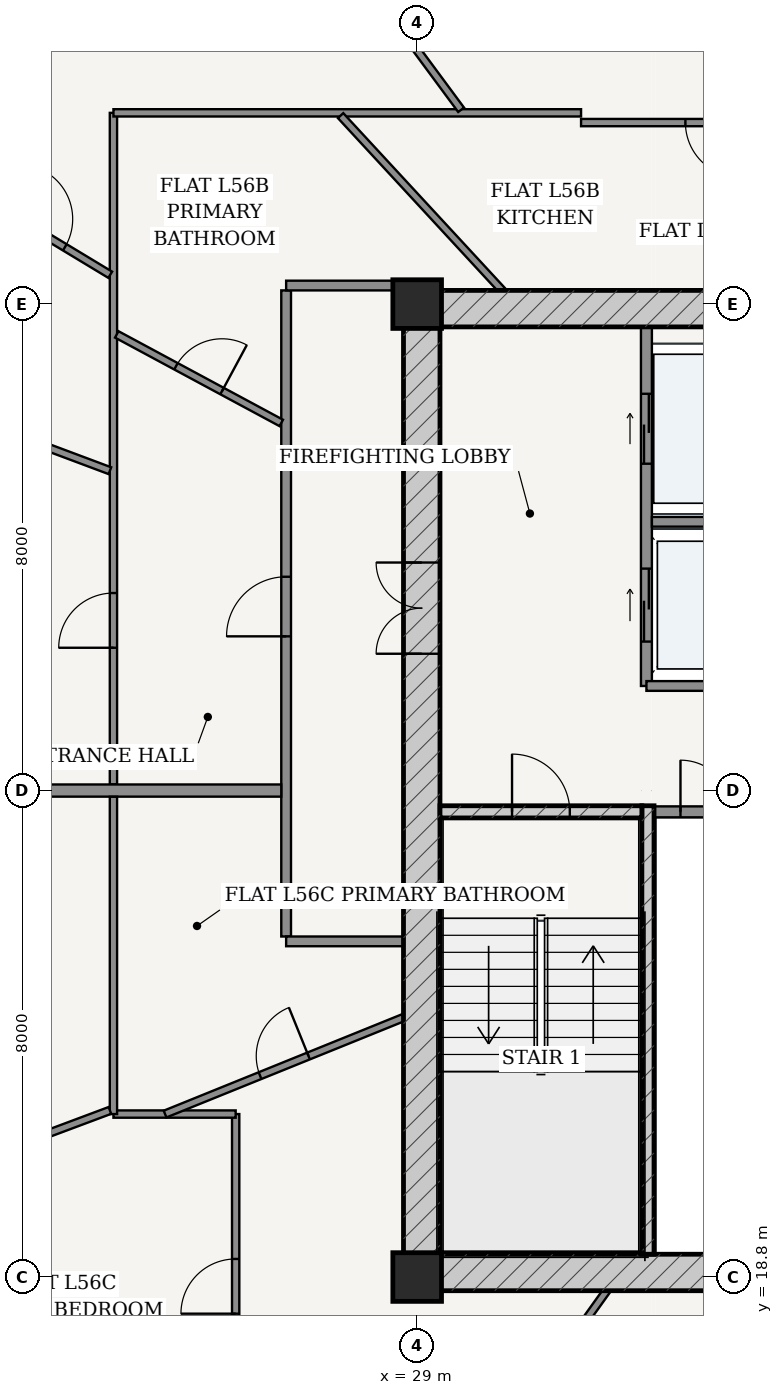
"""IFC4 building model, lengths in metres.
Left out: names, types, materials, properties, quantities, classifications, styles, units other than length and angle.
Written with IfcOpenShell. Run it as: python <this file> out.ifc"""

import sys

from ifc_helpers import new_model, si_unit, direction, frame, frame_2d, origin, origin_2d, place, context, subcontext, project, spatial, rectangle, extrude, source, transform, mapped, element, fill, save


model = new_model("IFC4")
c1 = context("Model", 3, precision=1e-05, world=origin(), true_north=direction((-0.2419218956, 0.970295726276)))
c2 = subcontext(c1, "Body", "Model", "MODEL_VIEW")
j1 = project(units=[si_unit("LENGTHUNIT", "METRE"), si_unit("PLANEANGLEUNIT", "RADIAN")], contexts=[c1])
p1 = place(None, origin())
s1 = spatial("IfcSite", under=j1, at=p1, CompositionType="ELEMENT")
p2 = place(p1, origin())
s2 = spatial("IfcBuilding", under=s1, at=p2, CompositionType="ELEMENT")
p3 = place(p2, frame((0.0, 0.0, 213.4)))
s3 = spatial("IfcBuildingStorey", under=s2, at=p3, CompositionType="ELEMENT", Elevation=213.4)
for number, where, z_axis, x_axis in (
    (1, (29.0, 18.8, 0.0), (0.0, 0.0, 1.0), (1.0, 0.0, 0.0)),
    (2, (29.0, 34.8, 0.0), (0.0, 0.0, 1.0), (1.0, 0.0, 0.0)),
):
    element("IfcColumn", number, at=place(p3, frame(where, z_axis=z_axis, x_axis=x_axis)), inside=s3, PredefinedType="COLUMN", context=c2, shape_type="SweptSolid", body=[
        extrude(rectangle(XDim=0.8, YDim=0.8, at=origin_2d()), origin(), (0.0, 0.0, 1.0), 3.7),
    ])
p4 = place(p3, frame((28.775, 18.875, 0.0), z_axis=(0.0, 0.0, 1.0), x_axis=(1.0, 0.0, 0.0)))
e3 = element("IfcWall", 3, at=p4, inside=s3, PredefinedType="SHEAR", context=c2, shape_type="SweptSolid", body=[
    extrude(rectangle(XDim=18.45, YDim=0.6, at=frame_2d((9.225, 0.0))), origin(), (0.0, 0.0, 1.0), 3.435),
])
p5 = place(p4, frame((7.46, 0.0, 0.0)))
e4 = element("IfcOpeningElement", 4, at=p5, cuts=e3, PredefinedType="OPENING", context=c2, shape_type="SweptSolid", body=[
    extrude(rectangle(XDim=0.85, YDim=2.1, at=frame_2d((0.425, 1.05))), frame((0.0, 0.31, 0.0), z_axis=(0.0, -1.0, 0.0), x_axis=(1.0, 0.0, 0.0)), (0.0, 0.0, 1.0), 0.62),
])
p6 = place(p4, frame((10.54, 0.0, 0.0)))
e5 = element("IfcOpeningElement", 5, at=p6, cuts=e3, PredefinedType="OPENING", context=c2, shape_type="SweptSolid", body=[
    extrude(rectangle(XDim=0.85, YDim=2.1, at=frame_2d((0.425, 1.05))), frame((0.0, 0.31, 0.0), z_axis=(0.0, -1.0, 0.0), x_axis=(1.0, 0.0, 0.0)), (0.0, 0.0, 1.0), 0.62),
])
p7 = place(p3, frame((28.775, 34.725, 0.0), z_axis=(0.0, 0.0, 1.0), x_axis=(1.0, 0.0, 0.0)))
e6 = element("IfcWall", 6, at=p7, inside=s3, PredefinedType="SHEAR", context=c2, shape_type="SweptSolid", body=[
    extrude(rectangle(XDim=18.45, YDim=0.6, at=frame_2d((9.225, 0.0))), origin(), (0.0, 0.0, 1.0), 3.435),
])
p8 = place(p3, frame((29.075, 19.175, 0.0), z_axis=(0.0, 0.0, 1.0), x_axis=(0.0, 1.0, 0.0)))
e7 = element("IfcWall", 7, at=p8, inside=s3, PredefinedType="SHEAR", context=c2, shape_type="SweptSolid", body=[
    extrude(rectangle(XDim=15.25, YDim=0.6, at=frame_2d((7.625, 0.0))), origin(), (0.0, 0.0, 1.0), 3.435),
])
p9 = place(p8, frame((9.875, 0.0, 0.0)))
e8 = element("IfcOpeningElement", 8, at=p9, cuts=e7, PredefinedType="OPENING", context=c2, shape_type="SweptSolid", body=[
    extrude(rectangle(XDim=1.5, YDim=2.2, at=frame_2d((0.75, 1.1))), frame((0.0, 0.31, 0.0), z_axis=(0.0, -1.0, 0.0), x_axis=(1.0, 0.0, 0.0)), (0.0, 0.0, 1.0), 0.62),
])
p10 = place(p3, frame((32.795, 19.175, 0.0), z_axis=(0.0, 0.0, 1.0), x_axis=(0.0, 1.0, 0.0)))
e9 = element("IfcWall", 9, at=p10, inside=s3, PredefinedType="SOLIDWALL", context=c2, shape_type="SweptSolid", body=[
    extrude(rectangle(XDim=7.375, YDim=0.2, at=frame_2d((3.688, 0.0))), origin(), (0.0, 0.0, 1.0), 3.435),
])
p11 = place(p3, frame((29.375, 26.45, 0.0), z_axis=(0.0, 0.0, 1.0), x_axis=(1.0, 0.0, 0.0)))
e10 = element("IfcWall", 10, at=p11, inside=s3, PredefinedType="SOLIDWALL", context=c2, shape_type="SweptSolid", body=[
    extrude(rectangle(XDim=3.32, YDim=0.2, at=frame_2d((1.66, 0.0))), origin(), (0.0, 0.0, 1.0), 3.435),
])
p12 = place(p11, frame((1.185, 0.0, 0.0)))
e11 = element("IfcOpeningElement", 11, at=p12, cuts=e10, PredefinedType="OPENING", context=c2, shape_type="SweptSolid", body=[
    extrude(rectangle(XDim=0.95, YDim=2.15, at=frame_2d((0.475, 1.075))), frame((0.0, 0.11, 0.0), z_axis=(0.0, -1.0, 0.0), x_axis=(1.0, 0.0, 0.0)), (0.0, 0.0, 1.0), 0.22),
])
p13 = place(p3, frame((32.9, 26.45, 0.0), z_axis=(0.0, 0.0, 1.0), x_axis=(1.0, 0.0, 0.0)))
e12 = element("IfcWall", 12, at=p13, inside=s3, PredefinedType="PARTITIONING", context=c2, shape_type="SweptSolid", body=[
    extrude(rectangle(XDim=1.71, YDim=0.18, at=frame_2d((0.855, 0.0))), origin(), (0.0, 0.0, 1.0), 3.435),
])
p14 = place(p13, frame((0.43, 0.0, 0.0)))
e13 = element("IfcOpeningElement", 13, at=p14, cuts=e12, PredefinedType="OPENING", context=c2, shape_type="SweptSolid", body=[
    extrude(rectangle(XDim=0.85, YDim=2.1, at=frame_2d((0.425, 1.05))), frame((0.0, 0.1, 0.0), z_axis=(0.0, -1.0, 0.0), x_axis=(1.0, 0.0, 0.0)), (0.0, 0.0, 1.0), 0.2),
])
p15 = place(p3, frame((32.77, 28.52, 0.0), z_axis=(0.0, 0.0, 1.0), x_axis=(0.0, 1.0, 0.0)))
e14 = element("IfcWall", 14, at=p15, inside=s3, PredefinedType="PARTITIONING", context=c2, shape_type="SweptSolid", body=[
    extrude(rectangle(XDim=5.905, YDim=0.18, at=frame_2d((2.953, 0.0))), origin(), (0.0, 0.0, 1.0), 3.435),
])
p16 = place(p15, frame((3.655, 0.0, 0.0)))
e15 = element("IfcOpeningElement", 15, at=p16, cuts=e14, PredefinedType="OPENING", context=c2, shape_type="SweptSolid", body=[
    extrude(rectangle(XDim=1.15, YDim=2.2, at=frame_2d((0.575, 1.1))), frame((0.0, 0.1, 0.0), z_axis=(0.0, -1.0, 0.0), x_axis=(1.0, 0.0, 0.0)), (0.0, 0.0, 1.0), 0.2),
])
p17 = place(p15, frame((0.73, 0.0, 0.0)))
e16 = element("IfcOpeningElement", 16, at=p17, cuts=e14, PredefinedType="OPENING", context=c2, shape_type="SweptSolid", body=[
    extrude(rectangle(XDim=1.2, YDim=2.25, at=frame_2d((0.6, 1.125))), frame((0.0, 0.1, 0.0), z_axis=(0.0, -1.0, 0.0), x_axis=(1.0, 0.0, 0.0)), (0.0, 0.0, 1.0), 0.2),
])
p18 = place(p3, frame((32.86, 31.22, 0.0), z_axis=(0.0, 0.0, 1.0), x_axis=(1.0, 0.0, 0.0)))
e17 = element("IfcWall", 17, at=p18, inside=s3, PredefinedType="PARTITIONING", context=c2, shape_type="SweptSolid", body=[
    extrude(rectangle(XDim=1.75, YDim=0.16, at=frame_2d((0.875, 0.0))), origin(), (0.0, 0.0, 1.0), 3.435),
])
p19 = place(p3, frame((32.77, 28.52, 0.0), z_axis=(0.0, 0.0, 1.0), x_axis=(1.0, 0.0, 0.0)))
e18 = element("IfcWall", 18, at=p19, inside=s3, PredefinedType="PARTITIONING", context=c2, shape_type="SweptSolid", body=[
    extrude(rectangle(XDim=1.84, YDim=0.16, at=frame_2d((0.92, 0.0))), origin(), (0.0, 0.0, 1.0), 3.435),
])
p20 = place(p3, frame((26.845, 24.4, 0.0), z_axis=(0.0, 0.0, 1.0), x_axis=(0.0, 1.0, 0.0)))
e19 = element("IfcWall", 19, at=p20, inside=s3, PredefinedType="PARTITIONING", context=c2, shape_type="SweptSolid", body=[
    extrude(rectangle(XDim=10.625, YDim=0.16, at=frame_2d((5.312, 0.0))), origin(), (0.0, 0.0, 1.0), 2.951),
])
p21 = place(p20, frame((4.936, 0.0, 0.0)))
e20 = element("IfcOpeningElement", 20, at=p21, cuts=e19, PredefinedType="OPENING", context=c2, shape_type="SweptSolid", body=[
    extrude(rectangle(XDim=0.98, YDim=2.2, at=frame_2d((0.49, 1.1))), frame((0.0, 0.09, 0.0), z_axis=(0.0, -1.0, 0.0), x_axis=(1.0, 0.0, 0.0)), (0.0, 0.0, 1.0), 0.18),
])
for number, where, z_axis, x_axis in (
    (21, (26.845, 35.105, 0.0), (0.0, 0.0, 1.0), (1.0, 0.0, 0.0)),
    (22, (26.845, 24.32, 0.0), (0.0, 0.0, 1.0), (1.0, 0.0, 0.0)),
):
    element("IfcWall", number, at=place(p3, frame(where, z_axis=z_axis, x_axis=x_axis)), inside=s3, PredefinedType="PARTITIONING", context=c2, shape_type="SweptSolid", body=[
        extrude(rectangle(XDim=1.93, YDim=0.16, at=frame_2d((0.965, 0.0))), origin(), (0.0, 0.0, 1.0), 3.435),
    ])
p22 = place(p3, frame((24.005, 26.902, 0.0), z_axis=(0.0, 0.0, 1.0), x_axis=(0.0, 1.0, 0.0)))
e23 = element("IfcWall", 23, at=p22, inside=s3, PredefinedType="PARTITIONING", context=c2, shape_type="SweptSolid", body=[
    extrude(rectangle(XDim=11.043, YDim=0.12, at=frame_2d((5.521, 0.0))), origin(), (0.0, 0.0, 1.0), 2.951),
])
p23 = place(p22, frame((2.246, 0.0, 0.0)))
e24 = element("IfcOpeningElement", 24, at=p23, cuts=e23, PredefinedType="OPENING", context=c2, shape_type="SweptSolid", body=[
    extrude(rectangle(XDim=0.9, YDim=2.15, at=frame_2d((0.45, 1.075))), frame((0.0, 0.07, 0.0), z_axis=(0.0, -1.0, 0.0), x_axis=(1.0, 0.0, 0.0)), (0.0, 0.0, 1.0), 0.14),
])
p24 = place(p3, frame((24.005, 37.945, 0.0), z_axis=(0.0, 0.0, 1.0), x_axis=(1.0, 0.0, 0.0)))
e25 = element("IfcWall", 25, at=p24, inside=s3, PredefinedType="PARTITIONING", context=c2, shape_type="SweptSolid", body=[
    extrude(rectangle(XDim=7.69, YDim=0.12, at=frame_2d((3.845, 0.0))), origin(), (0.0, 0.0, 1.0), 2.951),
])
p25 = place(p3, frame((31.695, 37.785, 0.0), z_axis=(0.0, 0.0, 1.0), x_axis=(1.0, 0.0, 0.0)))
e26 = element("IfcWall", 26, at=p25, inside=s3, PredefinedType="PARTITIONING", context=c2, shape_type="SweptSolid", body=[
    extrude(rectangle(XDim=8.621, YDim=0.12, at=frame_2d((4.311, 0.0))), origin(), (0.0, 0.0, 1.0), 2.951),
])
p26 = place(p25, frame((1.716, 0.0, 0.0)))
e27 = element("IfcOpeningElement", 27, at=p26, cuts=e26, PredefinedType="OPENING", context=c2, shape_type="SweptSolid", body=[
    extrude(rectangle(XDim=0.9, YDim=2.15, at=frame_2d((0.45, 1.075))), frame((0.0, 0.07, 0.0), z_axis=(0.0, -1.0, 0.0), x_axis=(1.0, 0.0, 0.0)), (0.0, 0.0, 1.0), 0.14),
])
p27 = place(p25, frame((5.784, 0.0, 0.0)))
e28 = element("IfcOpeningElement", 28, at=p27, cuts=e26, PredefinedType="OPENING", context=c2, shape_type="SweptSolid", body=[
    extrude(rectangle(XDim=0.9, YDim=2.15, at=frame_2d((0.45, 1.075))), frame((0.0, 0.07, 0.0), z_axis=(0.0, -1.0, 0.0), x_axis=(1.0, 0.0, 0.0)), (0.0, 0.0, 1.0), 0.14),
])
p28 = place(p3, frame((29.722, 37.995, 0.0), z_axis=(0.0, 0.0, 1.0), x_axis=(-0.594518724985, 0.80408176552, 0.0)))
e29 = element("IfcWall", 29, at=p28, inside=s3, PredefinedType="PARTITIONING", context=c2, shape_type="SweptSolid", body=[
    extrude(rectangle(XDim=6.344, YDim=0.12, at=frame_2d((3.172, 0.0))), origin(), (0.0, 0.0, 1.0), 2.951),
])
p29 = place(p28, frame((1.715, 0.0, 0.0)))
e30 = element("IfcOpeningElement", 30, at=p29, cuts=e29, PredefinedType="OPENING", context=c2, shape_type="SweptSolid", body=[
    extrude(rectangle(XDim=0.9, YDim=2.15, at=frame_2d((0.45, 1.075))), frame((0.0, 0.07, 0.0), z_axis=(0.0, -1.0, 0.0), x_axis=(1.0, 0.0, 0.0)), (0.0, 0.0, 1.0), 0.14),
])
p30 = place(p3, frame((23.952, 35.282, 0.0), z_axis=(0.0, 0.0, 1.0), x_axis=(-0.856051317976, 0.516890840499, 0.0)))
e31 = element("IfcWall", 31, at=p30, inside=s3, PredefinedType="PARTITIONING", context=c2, shape_type="SweptSolid", body=[
    extrude(rectangle(XDim=4.658, YDim=0.12, at=frame_2d((2.329, 0.0))), origin(), (0.0, 0.0, 1.0), 2.951),
])
p31 = place(p30, frame((0.872, 0.0, 0.0)))
e32 = element("IfcOpeningElement", 32, at=p31, cuts=e31, PredefinedType="OPENING", context=c2, shape_type="SweptSolid", body=[
    extrude(rectangle(XDim=0.9, YDim=2.15, at=frame_2d((0.45, 1.075))), frame((0.0, 0.07, 0.0), z_axis=(0.0, -1.0, 0.0), x_axis=(1.0, 0.0, 0.0)), (0.0, 0.0, 1.0), 0.14),
])
p32 = place(p3, frame((23.947, 32.06, 0.0), z_axis=(0.0, 0.0, 1.0), x_axis=(-0.936547148815, 0.350541635255, 0.0)))
e33 = element("IfcWall", 33, at=p32, inside=s3, PredefinedType="PARTITIONING", context=c2, shape_type="SweptSolid", body=[
    extrude(rectangle(XDim=6.439, YDim=0.12, at=frame_2d((3.219, 0.0))), origin(), (0.0, 0.0, 1.0), 2.951),
])
p33 = place(p32, frame((2.769, 0.0, 0.0)))
e34 = element("IfcOpeningElement", 34, at=p33, cuts=e33, PredefinedType="OPENING", context=c2, shape_type="SweptSolid", body=[
    extrude(rectangle(XDim=0.9, YDim=2.15, at=frame_2d((0.45, 1.075))), frame((0.0, 0.07, 0.0), z_axis=(0.0, -1.0, 0.0), x_axis=(1.0, 0.0, 0.0)), (0.0, 0.0, 1.0), 0.14),
])
p34 = place(p3, frame((30.396, 35.026, 0.0), z_axis=(0.0, 0.0, 1.0), x_axis=(-0.678759446058, 0.734360684124, 0.0)))
e35 = element("IfcWall", 35, at=p34, inside=s3, PredefinedType="PARTITIONING", context=c2, shape_type="SweptSolid", body=[
    extrude(rectangle(XDim=3.912, YDim=0.12, at=frame_2d((1.956, 0.0))), origin(), (0.0, 0.0, 1.0), 2.951),
])
p35 = place(p3, frame((26.765, 32.845, 0.0), z_axis=(0.0, 0.0, 1.0), x_axis=(-0.88059355453, 0.473872336943, 0.0)))
e36 = element("IfcWall", 36, at=p35, inside=s3, PredefinedType="PARTITIONING", context=c2, shape_type="SweptSolid", body=[
    extrude(rectangle(XDim=3.072, YDim=0.12, at=frame_2d((1.536, 0.0))), origin(), (0.0, 0.0, 1.0), 3.11),
])
p36 = place(p35, frame((1.106, 0.0, 0.0)))
e37 = element("IfcOpeningElement", 37, at=p36, cuts=e36, PredefinedType="OPENING", context=c2, shape_type="SweptSolid", body=[
    extrude(rectangle(XDim=0.86, YDim=2.15, at=frame_2d((0.43, 1.075))), frame((0.0, 0.07, 0.0), z_axis=(0.0, -1.0, 0.0), x_axis=(1.0, 0.0, 0.0)), (0.0, 0.0, 1.0), 0.14),
])
p37 = place(p3, frame((26.765, 26.8, 0.0), z_axis=(0.0, 0.0, 1.0), x_axis=(-1.0, 0.0, 0.0)))
e38 = element("IfcWall", 38, at=p37, inside=s3, PredefinedType="PARTITIONING", context=c2, shape_type="SweptSolid", body=[
    extrude(rectangle(XDim=10.505, YDim=0.2, at=frame_2d((5.252, 0.0))), origin(), (0.0, 0.0, 1.0), 2.951),
])
p38 = place(p3, frame((26.015, 15.815, 0.0), z_axis=(0.0, 0.0, 1.0), x_axis=(0.0, 1.0, 0.0)))
e39 = element("IfcWall", 39, at=p38, inside=s3, PredefinedType="PARTITIONING", context=c2, shape_type="SweptSolid", body=[
    extrude(rectangle(XDim=5.665, YDim=0.12, at=frame_2d((2.833, 0.0))), origin(), (0.0, 0.0, 1.0), 2.951),
])
p39 = place(p38, frame((2.383, 0.0, 0.0)))
e40 = element("IfcOpeningElement", 40, at=p39, cuts=e39, PredefinedType="OPENING", context=c2, shape_type="SweptSolid", body=[
    extrude(rectangle(XDim=0.9, YDim=2.15, at=frame_2d((0.45, 1.075))), frame((0.0, 0.07, 0.0), z_axis=(0.0, -1.0, 0.0), x_axis=(1.0, 0.0, 0.0)), (0.0, 0.0, 1.0), 0.14),
])
p40 = place(p3, frame((26.015, 21.48, 0.0), z_axis=(0.0, 0.0, 1.0), x_axis=(-1.0, 0.0, 0.0)))
e41 = element("IfcWall", 41, at=p40, inside=s3, PredefinedType="PARTITIONING", context=c2, shape_type="SweptSolid", body=[
    extrude(rectangle(XDim=2.01, YDim=0.12, at=frame_2d((1.005, 0.0))), origin(), (0.0, 0.0, 1.0), 3.11),
])
p41 = place(p3, frame((24.005, 21.48, 0.0), z_axis=(0.0, 0.0, 1.0), x_axis=(0.0, 1.0, 0.0)))
e42 = element("IfcWall", 42, at=p41, inside=s3, PredefinedType="PARTITIONING", context=c2, shape_type="SweptSolid", body=[
    extrude(rectangle(XDim=5.218, YDim=0.12, at=frame_2d((2.609, 0.0))), origin(), (0.0, 0.0, 1.0), 2.951),
])
p42 = place(p3, frame((23.947, 21.54, 0.0), z_axis=(0.0, 0.0, 1.0), x_axis=(-0.936534700322, -0.350574892274, 0.0)))
e43 = element("IfcWall", 43, at=p42, inside=s3, PredefinedType="PARTITIONING", context=c2, shape_type="SweptSolid", body=[
    extrude(rectangle(XDim=6.439, YDim=0.12, at=frame_2d((3.219, 0.0))), origin(), (0.0, 0.0, 1.0), 2.951),
])
p43 = place(p42, frame((2.769, 0.0, 0.0)))
e44 = element("IfcOpeningElement", 44, at=p43, cuts=e43, PredefinedType="OPENING", context=c2, shape_type="SweptSolid", body=[
    extrude(rectangle(XDim=0.9, YDim=2.15, at=frame_2d((0.45, 1.075))), frame((0.0, 0.07, 0.0), z_axis=(0.0, -1.0, 0.0), x_axis=(1.0, 0.0, 0.0)), (0.0, 0.0, 1.0), 0.14),
])
p44 = place(p3, frame((28.775, 23.067, 0.0), z_axis=(0.0, 0.0, 1.0), x_axis=(-0.926976443277, -0.375119545757, 0.0)))
e45 = element("IfcWall", 45, at=p44, inside=s3, PredefinedType="PARTITIONING", context=c2, shape_type="SweptSolid", body=[
    extrude(rectangle(XDim=4.23, YDim=0.12, at=frame_2d((2.115, 0.0))), origin(), (0.0, 0.0, 1.0), 3.435),
])
p45 = place(p44, frame((1.685, 0.0, 0.0)))
e46 = element("IfcOpeningElement", 46, at=p45, cuts=e45, PredefinedType="OPENING", context=c2, shape_type="SweptSolid", body=[
    extrude(rectangle(XDim=0.86, YDim=2.15, at=frame_2d((0.43, 1.075))), frame((0.0, 0.07, 0.0), z_axis=(0.0, -1.0, 0.0), x_axis=(1.0, 0.0, 0.0)), (0.0, 0.0, 1.0), 0.14),
])
p46 = place(p3, frame((32.117, 18.575, 0.0), z_axis=(0.0, 0.0, 1.0), x_axis=(-0.581813438478, -0.813322274874, 0.0)))
e47 = element("IfcWall", 47, at=p46, inside=s3, PredefinedType="PARTITIONING", context=c2, shape_type="SweptSolid", body=[
    extrude(rectangle(XDim=3.331, YDim=0.12, at=frame_2d((1.666, 0.0))), origin(), (0.0, 0.0, 1.0), 3.435),
])
p47 = place(p46, frame((1.216, 0.0, 0.0)))
e48 = element("IfcOpeningElement", 48, at=p47, cuts=e47, PredefinedType="OPENING", context=c2, shape_type="SweptSolid", body=[
    extrude(rectangle(XDim=0.9, YDim=2.15, at=frame_2d((0.45, 1.075))), frame((0.0, 0.07, 0.0), z_axis=(0.0, -1.0, 0.0), x_axis=(1.0, 0.0, 0.0)), (0.0, 0.0, 1.0), 0.14),
])
m1 = source(origin(), c2, "Body", "SweptSolid", [
    extrude(rectangle(XDim=1.5, YDim=2.2, at=frame_2d((0.75, 1.1))), frame((0.0, 0.025, 0.0), z_axis=(0.0, -1.0, 0.0), x_axis=(1.0, 0.0, 0.0)), (0.0, 0.0, 1.0), 0.05),
])
p48 = place(p9, origin())
e49 = element("IfcDoor", 49, at=p48, inside=s3, OperationType="DOUBLE_DOOR_SINGLE_SWING", PredefinedType="DOOR", context=c2, shape_type="MappedRepresentation", body=[
    mapped(m1, transform((0.0, 0.0, 0.0), scale=1.0)),
])
fill(e8, e49)
m2 = source(origin(), c2, "Body", "SweptSolid", [
    extrude(rectangle(XDim=0.95, YDim=2.15, at=frame_2d((0.475, 1.075))), frame((0.0, 0.025, 0.0), z_axis=(0.0, -1.0, 0.0), x_axis=(1.0, 0.0, 0.0)), (0.0, 0.0, 1.0), 0.05),
])
p49 = place(p12, origin())
e50 = element("IfcDoor", 50, at=p49, inside=s3, OperationType="SINGLE_SWING_LEFT", PredefinedType="DOOR", context=c2, shape_type="MappedRepresentation", body=[
    mapped(m2, transform((0.0, 0.0, 0.0), scale=1.0)),
])
fill(e11, e50)
m3 = source(origin(), c2, "Body", "SweptSolid", [
    extrude(rectangle(XDim=0.85, YDim=2.1, at=frame_2d((0.425, 1.05))), frame((0.0, 0.025, 0.0), z_axis=(0.0, -1.0, 0.0), x_axis=(1.0, 0.0, 0.0)), (0.0, 0.0, 1.0), 0.05),
])
p50 = place(p14, origin())
e51 = element("IfcDoor", 51, at=p50, inside=s3, OperationType="SINGLE_SWING_LEFT", PredefinedType="DOOR", context=c2, shape_type="MappedRepresentation", body=[
    mapped(m3, transform((0.0, 0.0, 0.0), scale=1.0)),
])
fill(e13, e51)
m4 = source(origin(), c2, "Body", "SweptSolid", [
    extrude(rectangle(XDim=1.15, YDim=2.2, at=frame_2d((0.575, 1.1))), frame((0.0, 0.025, 0.0), z_axis=(0.0, -1.0, 0.0), x_axis=(1.0, 0.0, 0.0)), (0.0, 0.0, 1.0), 0.05),
])
p51 = place(p16, origin())
e52 = element("IfcDoor", 52, at=p51, inside=s3, OperationType="DOUBLE_DOOR_SLIDING", PredefinedType="DOOR", context=c2, shape_type="MappedRepresentation", body=[
    mapped(m4, transform((0.0, 0.0, 0.0), scale=1.0)),
])
fill(e15, e52)
m5 = source(origin(), c2, "Body", "SweptSolid", [
    extrude(rectangle(XDim=1.2, YDim=2.25, at=frame_2d((0.6, 1.125))), frame((0.0, 0.025, 0.0), z_axis=(0.0, -1.0, 0.0), x_axis=(1.0, 0.0, 0.0)), (0.0, 0.0, 1.0), 0.05),
])
p52 = place(p17, origin())
e53 = element("IfcDoor", 53, at=p52, inside=s3, OperationType="DOUBLE_DOOR_SLIDING", PredefinedType="DOOR", context=c2, shape_type="MappedRepresentation", body=[
    mapped(m5, transform((0.0, 0.0, 0.0), scale=1.0)),
])
fill(e16, e53)
m6 = source(origin(), c2, "Body", "SweptSolid", [
    extrude(rectangle(XDim=0.98, YDim=2.2, at=frame_2d((0.49, 1.1))), frame((0.0, 0.025, 0.0), z_axis=(0.0, -1.0, 0.0), x_axis=(1.0, 0.0, 0.0)), (0.0, 0.0, 1.0), 0.05),
])
p53 = place(p21, origin())
e54 = element("IfcDoor", 54, at=p53, inside=s3, OperationType="SINGLE_SWING_LEFT", PredefinedType="DOOR", context=c2, shape_type="MappedRepresentation", body=[
    mapped(m6, transform((0.0, 0.0, 0.0), scale=1.0)),
])
fill(e20, e54)
m7 = source(origin(), c2, "Body", "SweptSolid", [
    extrude(rectangle(XDim=0.86, YDim=2.15, at=frame_2d((0.43, 1.075))), frame((0.0, 0.025, 0.0), z_axis=(0.0, -1.0, 0.0), x_axis=(1.0, 0.0, 0.0)), (0.0, 0.0, 1.0), 0.05),
])
p54 = place(p36, frame((0.86, 0.0, 0.0), z_axis=(0.0, 0.0, 1.0), x_axis=(-1.0, 0.0, 0.0)))
e55 = element("IfcDoor", 55, at=p54, inside=s3, OperationType="SINGLE_SWING_RIGHT", PredefinedType="DOOR", context=c2, shape_type="MappedRepresentation", body=[
    mapped(m7, transform((0.0, 0.0, 0.0), scale=1.0)),
])
fill(e37, e55)
m8 = source(origin(), c2, "Body", "SweptSolid", [
    extrude(rectangle(XDim=0.9, YDim=2.15, at=frame_2d((0.45, 1.075))), frame((0.0, 0.025, 0.0), z_axis=(0.0, -1.0, 0.0), x_axis=(1.0, 0.0, 0.0)), (0.0, 0.0, 1.0), 0.05),
])
p55 = place(p23, origin())
e56 = element("IfcDoor", 56, at=p55, inside=s3, OperationType="SINGLE_SWING_LEFT", PredefinedType="DOOR", context=c2, shape_type="MappedRepresentation", body=[
    mapped(m8, transform((0.0, 0.0, 0.0), scale=1.0)),
])
fill(e24, e56)
p56 = place(p31, frame((0.9, 0.0, 0.0), z_axis=(0.0, 0.0, 1.0), x_axis=(-1.0, 0.0, 0.0)))
e57 = element("IfcDoor", 57, at=p56, inside=s3, OperationType="SINGLE_SWING_LEFT", PredefinedType="DOOR", context=c2, shape_type="MappedRepresentation", body=[
    mapped(m8, transform((0.0, 0.0, 0.0), scale=1.0)),
])
fill(e32, e57)
p57 = place(p26, frame((0.9, 0.0, 0.0), z_axis=(0.0, 0.0, 1.0), x_axis=(-1.0, 0.0, 0.0)))
e58 = element("IfcDoor", 58, at=p57, inside=s3, OperationType="SINGLE_SWING_LEFT", PredefinedType="DOOR", context=c2, shape_type="MappedRepresentation", body=[
    mapped(m8, transform((0.0, 0.0, 0.0), scale=1.0)),
])
fill(e27, e58)
p58 = place(p39, origin())
e59 = element("IfcDoor", 59, at=p58, inside=s3, OperationType="SINGLE_SWING_LEFT", PredefinedType="DOOR", context=c2, shape_type="MappedRepresentation", body=[
    mapped(m8, transform((0.0, 0.0, 0.0), scale=1.0)),
])
fill(e40, e59)
p59 = place(p45, frame((0.86, 0.0, 0.0), z_axis=(0.0, 0.0, 1.0), x_axis=(-1.0, 0.0, 0.0)))
e60 = element("IfcDoor", 60, at=p59, inside=s3, OperationType="SINGLE_SWING_RIGHT", PredefinedType="DOOR", context=c2, shape_type="MappedRepresentation", body=[
    mapped(m7, transform((0.0, 0.0, 0.0), scale=1.0)),
])
fill(e46, e60)
save(model, sys.argv[1])
